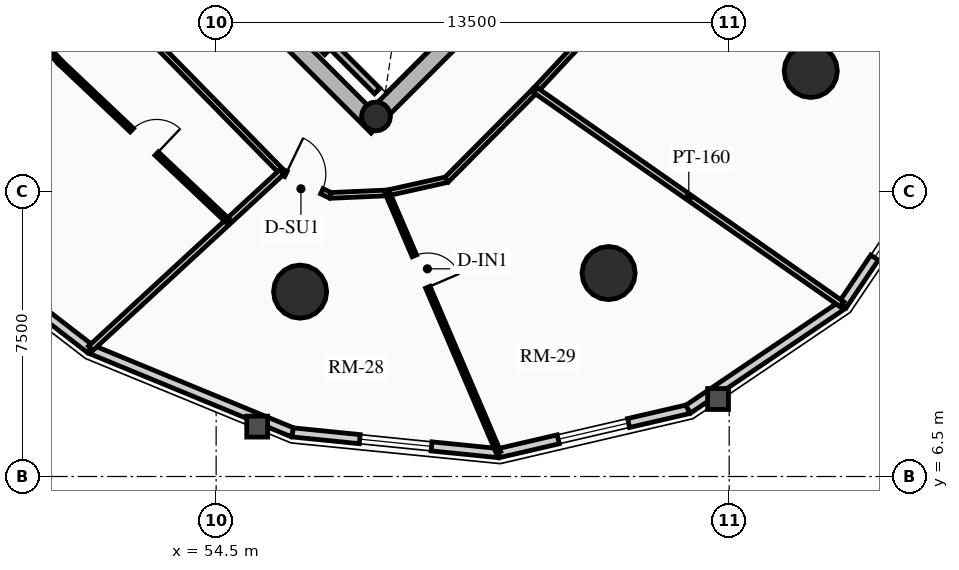
"""IFC4 building model, lengths in metres.
Left out: names, types, materials, properties, quantities, classifications, styles, units other than length and angle.
Written with IfcOpenShell. Run it as: python <this file> out.ifc"""

import sys

from ifc_helpers import new_model, si_unit, direction, frame, frame_2d, origin, origin_2d, place, context, subcontext, project, spatial, rectangle, circle, hollow_circle, extrude, source, transform, mapped, element, fill, save


model = new_model("IFC4")
c1 = context("Model", 3, precision=1e-05, world=origin(), true_north=direction((0.0, 1.0)))
c2 = subcontext(c1, "Body", "Model", "MODEL_VIEW")
j1 = project(units=[si_unit("LENGTHUNIT", "METRE"), si_unit("PLANEANGLEUNIT", "RADIAN")], contexts=[c1])
p1 = place(None, origin())
s1 = spatial("IfcSite", under=j1, at=p1, CompositionType="ELEMENT")
p2 = place(p1, origin())
s2 = spatial("IfcBuilding", under=s1, at=p2, CompositionType="ELEMENT")
p3 = place(p2, frame((0.0, 0.0, 116.71)))
s3 = spatial("IfcBuildingStorey", under=s2, at=p3, CompositionType="ELEMENT", Elevation=116.71)
p4 = place(p3, frame((58.737, 15.697, 0.0), z_axis=(0.0, 0.0, 1.0), x_axis=(-0.707106781187, 0.707106781187, 0.0)))
e1 = element("IfcWall", 1, at=p4, inside=s3, PredefinedType="SHEAR", context=c2, shape_type="SweptSolid", body=[
    extrude(rectangle(XDim=14.2, YDim=0.45, at=frame_2d((7.1, 0.0))), origin(), (0.0, 0.0, 1.0), 2.91),
])
p5 = place(p3, frame((58.578, 15.856, 0.0), z_axis=(0.0, 0.0, 1.0), x_axis=(0.707106781187, 0.707106781187, 0.0)))
e2 = element("IfcWall", 2, at=p5, inside=s3, PredefinedType="SHEAR", context=c2, shape_type="SweptSolid", body=[
    extrude(rectangle(XDim=10.7, YDim=0.45, at=frame_2d((5.35, 0.0))), origin(), (0.0, 0.0, 1.0), 2.91),
])
m1 = source(origin(), c2, "Body", "SweptSolid", [
    extrude(rectangle(XDim=1.5, YDim=2.02, at=frame_2d((0.75, 1.01))), frame((0.0, 0.235, 0.0), z_axis=(0.0, -1.0, 0.0), x_axis=(1.0, 0.0, 0.0)), (0.0, 0.0, 1.0), 0.47),
])
p6 = place(p5, frame((5.45, 0.0, 0.0)))
e3 = element("IfcOpeningElement", 3, at=p6, cuts=e2, PredefinedType="OPENING", context=c2, shape_type="MappedRepresentation", body=[
    mapped(m1, transform((0.0, 0.0, 0.0), x_axis=(1.0, 0.0, 0.0), y_axis=(0.0, 1.0, 0.0), z_axis=(0.0, 0.0, 1.0), scale=1.0)),
])
p7 = place(p3, frame((58.706, 15.976, 0.0), z_axis=(0.0, 0.0, 1.0), x_axis=(0.707106781187, 0.707106781187, 0.0)))
e4 = element("IfcColumn", 4, at=p7, inside=s3, PredefinedType="COLUMN", context=c2, shape_type="SweptSolid", body=[
    extrude(hollow_circle(Radius=0.38, WallThickness=0.032, at=origin_2d()), origin(), (0.0, 0.0, 1.0), 2.91),
])
for number, where, z_axis, x_axis in (
    (5, (56.709, 11.365, 0.0), (0.0, 0.0, 1.0), (1.0, 0.0, 0.0)),
    (6, (64.827, 11.854, 0.0), (0.0, 0.0, 1.0), (1.0, 0.0, 0.0)),
    (7, (70.146, 17.173, 0.0), (0.0, 0.0, 1.0), (1.0, 0.0, 0.0)),
):
    element("IfcColumn", number, at=place(p3, frame(where, z_axis=z_axis, x_axis=x_axis)), inside=s3, PredefinedType="USERDEFINED", context=c2, shape_type="SweptSolid", body=[
        extrude(circle(Radius=0.7, at=origin_2d()), origin(), (0.0, 0.0, 1.0), 2.91),
    ])
p8 = place(p3, frame((51.189, 9.855, 0.0), z_axis=(0.0, 0.0, 1.0), x_axis=(-0.791982052206, 0.61054437102, 0.0)))
e8 = element("IfcWall", 8, at=p8, inside=s3, PredefinedType="SOLIDWALL", context=c2, shape_type="SweptSolid", body=[
    extrude(rectangle(XDim=5.942, YDim=0.24, at=frame_2d((2.971, 0.0))), origin(), (0.0, 0.0, 1.0), 2.179),
])
m2 = source(origin(), c2, "Body", "SweptSolid", [
    extrude(rectangle(XDim=1.9, YDim=1.35, at=frame_2d((0.95, 0.675))), frame((0.0, 0.13, 0.0), z_axis=(0.0, -1.0, 0.0), x_axis=(1.0, 0.0, 0.0)), (0.0, 0.0, 1.0), 0.26),
])
p9 = place(p8, frame((2.021, 0.0, 0.65)))
e9 = element("IfcOpeningElement", 9, at=p9, cuts=e8, PredefinedType="OPENING", context=c2, shape_type="MappedRepresentation", body=[
    mapped(m2, transform((0.0, 0.0, 0.0), x_axis=(1.0, 0.0, 0.0), y_axis=(0.0, 1.0, 0.0), z_axis=(0.0, 0.0, 1.0), scale=1.0)),
])
p10 = place(p3, frame((56.513, 7.661, 0.0), z_axis=(0.0, 0.0, 1.0), x_axis=(-0.924563909604, 0.381027003055, 0.0)))
e10 = element("IfcWall", 10, at=p10, inside=s3, PredefinedType="SOLIDWALL", context=c2, shape_type="SweptSolid", body=[
    extrude(rectangle(XDim=5.758, YDim=0.24, at=frame_2d((2.879, 0.0))), origin(), (0.0, 0.0, 1.0), 2.179),
])
p11 = place(p3, frame((61.933, 7.115, 0.0), z_axis=(0.0, 0.0, 1.0), x_axis=(-0.994971754311, 0.10015591906, 0.0)))
e11 = element("IfcWall", 11, at=p11, inside=s3, PredefinedType="SOLIDWALL", context=c2, shape_type="SweptSolid", body=[
    extrude(rectangle(XDim=5.448, YDim=0.24, at=frame_2d((2.724, 0.0))), origin(), (0.0, 0.0, 1.0), 2.179),
])
p12 = place(p11, frame((1.774, 0.0, 0.65)))
e12 = element("IfcOpeningElement", 12, at=p12, cuts=e11, PredefinedType="OPENING", context=c2, shape_type="MappedRepresentation", body=[
    mapped(m2, transform((0.0, 0.0, 0.0), x_axis=(1.0, 0.0, 0.0), y_axis=(0.0, 1.0, 0.0), z_axis=(0.0, 0.0, 1.0), scale=1.0)),
])
p13 = place(p3, frame((66.92, 8.271, 0.0), z_axis=(0.0, 0.0, 1.0), x_axis=(-0.974165631126, -0.225834725257, 0.0)))
e13 = element("IfcWall", 13, at=p13, inside=s3, PredefinedType="SOLIDWALL", context=c2, shape_type="SweptSolid", body=[
    extrude(rectangle(XDim=5.119, YDim=0.24, at=frame_2d((2.56, 0.0))), origin(), (0.0, 0.0, 1.0), 2.179),
])
p14 = place(p13, frame((1.609, 0.0, 0.65)))
e14 = element("IfcOpeningElement", 14, at=p14, cuts=e13, PredefinedType="OPENING", context=c2, shape_type="MappedRepresentation", body=[
    mapped(m2, transform((0.0, 0.0, 0.0), x_axis=(1.0, 0.0, 0.0), y_axis=(0.0, 1.0, 0.0), z_axis=(0.0, 0.0, 1.0), scale=1.0)),
])
p15 = place(p3, frame((70.985, 11.015, 0.0), z_axis=(0.0, 0.0, 1.0), x_axis=(-0.828781148131, -0.559572880421, 0.0)))
e15 = element("IfcWall", 15, at=p15, inside=s3, PredefinedType="SOLIDWALL", context=c2, shape_type="SweptSolid", body=[
    extrude(rectangle(XDim=4.905, YDim=0.24, at=frame_2d((2.452, 0.0))), origin(), (0.0, 0.0, 1.0), 2.179),
])
p16 = place(p3, frame((73.729, 15.08, 0.0), z_axis=(0.0, 0.0, 1.0), x_axis=(-0.559572880421, -0.828781148131, 0.0)))
e16 = element("IfcWall", 16, at=p16, inside=s3, PredefinedType="SOLIDWALL", context=c2, shape_type="SweptSolid", body=[
    extrude(rectangle(XDim=4.905, YDim=0.24, at=frame_2d((2.452, 0.0))), origin(), (0.0, 0.0, 1.0), 2.179),
])
p17 = place(p16, frame((1.502, 0.0, 0.65)))
e17 = element("IfcOpeningElement", 17, at=p17, cuts=e16, PredefinedType="OPENING", context=c2, shape_type="MappedRepresentation", body=[
    mapped(m2, transform((0.0, 0.0, 0.0), x_axis=(1.0, 0.0, 0.0), y_axis=(0.0, 1.0, 0.0), z_axis=(0.0, 0.0, 1.0), scale=1.0)),
])
p18 = place(p3, frame((57.284, 17.673, 0.0), z_axis=(0.0, 0.0, 1.0), x_axis=(0.707147878904, 0.70706568108, 0.0)))
e18 = element("IfcWall", 18, at=p18, inside=s3, PredefinedType="SHEAR", context=c2, shape_type="SweptSolid", body=[
    extrude(rectangle(XDim=2.97, YDim=0.2, at=frame_2d((1.485, 0.0))), origin(), (0.0, 0.0, 1.0), 2.91),
])
p19 = place(p3, frame((58.737, 16.644, 0.0), z_axis=(0.0, 0.0, 1.0), x_axis=(-0.707032117043, 0.707181437447, 0.0)))
e19 = element("IfcWall", 19, at=p19, inside=s3, PredefinedType="SHEAR", context=c2, shape_type="SweptSolid", body=[
    extrude(rectangle(XDim=1.635, YDim=0.2, at=frame_2d((0.817, 0.0))), origin(), (0.0, 0.0, 1.0), 2.91),
])
p20 = place(p3, frame((51.914, 18.914, 0.0), z_axis=(0.0, 0.0, 1.0), x_axis=(0.699999313799, -0.714143515465, 0.0)))
e20 = element("IfcWall", 20, at=p20, inside=s3, PredefinedType="PARTITIONING", context=c2, shape_type="SweptSolid", body=[
    extrude(rectangle(XDim=6.162, YDim=0.15, at=frame_2d((3.081, 0.0))), origin(), (0.0, 0.0, 1.0), 2.225),
])
p21 = place(p3, frame((56.227, 14.513, 0.0), z_axis=(0.0, 0.0, 1.0), x_axis=(0.901477579283, -0.432825801044, 0.0)))
e21 = element("IfcWall", 21, at=p21, inside=s3, PredefinedType="PARTITIONING", context=c2, shape_type="SweptSolid", body=[
    extrude(rectangle(XDim=1.424, YDim=0.15, at=frame_2d((0.712, 0.0))), origin(), (0.0, 0.0, 1.0), 2.225),
])
m3 = source(origin(), c2, "Body", "SweptSolid", [
    extrude(rectangle(XDim=1.05, YDim=2.015, at=frame_2d((0.525, 1.007))), frame((0.0, 0.085, 0.0), z_axis=(0.0, -1.0, 0.0), x_axis=(1.0, 0.0, 0.0)), (0.0, 0.0, 1.0), 0.17),
])
p22 = place(p21, frame((0.12, 0.0, 0.0)))
e22 = element("IfcOpeningElement", 22, at=p22, cuts=e21, PredefinedType="OPENING", context=c2, shape_type="MappedRepresentation", body=[
    mapped(m3, transform((0.0, 0.0, 0.0), x_axis=(1.0, 0.0, 0.0), y_axis=(0.0, 1.0, 0.0), z_axis=(0.0, 0.0, 1.0), scale=1.0)),
])
p23 = place(p3, frame((57.511, 13.897, 0.0), z_axis=(0.0, 0.0, 1.0), x_axis=(0.999024538494, 0.044158481476, 0.0)))
e23 = element("IfcWall", 23, at=p23, inside=s3, PredefinedType="PARTITIONING", context=c2, shape_type="SweptSolid", body=[
    extrude(rectangle(XDim=1.498, YDim=0.15, at=frame_2d((0.749, 0.0))), origin(), (0.0, 0.0, 1.0), 2.225),
])
p24 = place(p3, frame((59.008, 13.963, 0.0), z_axis=(0.0, 0.0, 1.0), x_axis=(0.976020856791, 0.21767702476, 0.0)))
e24 = element("IfcWall", 24, at=p24, inside=s3, PredefinedType="PARTITIONING", context=c2, shape_type="SweptSolid", body=[
    extrude(rectangle(XDim=1.593, YDim=0.15, at=frame_2d((0.796, 0.0))), origin(), (0.0, 0.0, 1.0), 2.225),
])
p25 = place(p3, frame((60.562, 14.31, 0.0), z_axis=(0.0, 0.0, 1.0), x_axis=(0.704566236161, 0.709638230975, 0.0)))
e25 = element("IfcWall", 25, at=p25, inside=s3, PredefinedType="PARTITIONING", context=c2, shape_type="SweptSolid", body=[
    extrude(rectangle(XDim=3.321, YDim=0.15, at=frame_2d((1.661, 0.0))), origin(), (0.0, 0.0, 1.0), 2.225),
])
p26 = place(p3, frame((62.903, 16.667, 0.0), z_axis=(0.0, 0.0, 1.0), x_axis=(0.682371947497, 0.731005147225, 0.0)))
e26 = element("IfcWall", 26, at=p26, inside=s3, PredefinedType="PARTITIONING", context=c2, shape_type="SweptSolid", body=[
    extrude(rectangle(XDim=6.642, YDim=0.15, at=frame_2d((3.321, 0.0))), origin(), (0.0, 0.0, 1.0), 2.225),
])
p27 = place(p3, frame((56.227, 14.513, 0.0), z_axis=(0.0, 0.0, 1.0), x_axis=(-0.734951144322, -0.678120059768, 0.0)))
e27 = element("IfcWall", 27, at=p27, inside=s3, PredefinedType="PARTITIONING", context=c2, shape_type="SweptSolid", body=[
    extrude(rectangle(XDim=6.843, YDim=0.16, at=frame_2d((3.422, 0.0))), origin(), (0.0, 0.0, 1.0), 2.179),
])
p28 = place(p3, frame((62.903, 16.667, 0.0), z_axis=(0.0, 0.0, 1.0), x_axis=(0.819735047612, -0.572742919395, 0.0)))
e28 = element("IfcWall", 28, at=p28, inside=s3, PredefinedType="PARTITIONING", context=c2, shape_type="SweptSolid", body=[
    extrude(rectangle(XDim=9.842, YDim=0.16, at=frame_2d((4.921, 0.0))), origin(), (0.0, 0.0, 1.0), 2.179),
])
p29 = place(p3, frame((46.352, 21.838, 0.0), z_axis=(0.0, 0.0, 1.0), x_axis=(0.673416949194, -0.739262884594, 0.0)))
e29 = element("IfcWall", 29, at=p29, inside=s3, PredefinedType="PARTITIONING", context=c2, shape_type="SweptSolid", body=[
    extrude(rectangle(XDim=6.007, YDim=0.125, at=frame_2d((3.003, 0.0))), origin(), (0.0, 0.0, 1.0), 2.655),
])
p30 = place(p3, frame((50.397, 17.397, 0.0), z_axis=(0.0, 0.0, 1.0), x_axis=(0.726427828833, -0.687242758781, 0.0)))
e30 = element("IfcWall", 30, at=p30, inside=s3, PredefinedType="PARTITIONING", context=c2, shape_type="SweptSolid", body=[
    extrude(rectangle(XDim=6.087, YDim=0.125, at=frame_2d((3.043, 0.0))), origin(), (0.0, 0.0, 1.0), 2.225),
])
m4 = source(origin(), c2, "Body", "SweptSolid", [
    extrude(rectangle(XDim=0.9, YDim=2.005, at=frame_2d((0.45, 1.002))), frame((0.0, 0.073, 0.0), z_axis=(0.0, -1.0, 0.0), x_axis=(1.0, 0.0, 0.0)), (0.0, 0.0, 1.0), 0.145),
])
p31 = place(p30, frame((2.594, 0.0, 0.0)))
e31 = element("IfcOpeningElement", 31, at=p31, cuts=e30, PredefinedType="OPENING", context=c2, shape_type="MappedRepresentation", body=[
    mapped(m4, transform((0.0, 0.0, 0.0), x_axis=(1.0, 0.0, 0.0), y_axis=(0.0, 1.0, 0.0), z_axis=(0.0, 0.0, 1.0), scale=1.0)),
])
p32 = place(p3, frame((59.008, 13.963, 0.0), z_axis=(0.0, 0.0, 1.0), x_axis=(0.393439207333, -0.919350635032, 0.0)))
e32 = element("IfcWall", 32, at=p32, inside=s3, PredefinedType="PARTITIONING", context=c2, shape_type="SweptSolid", body=[
    extrude(rectangle(XDim=7.427, YDim=0.125, at=frame_2d((3.713, 0.0))), origin(), (0.0, 0.0, 1.0), 2.179),
])
p33 = place(p32, frame((1.8, 0.0, 0.0)))
e33 = element("IfcOpeningElement", 33, at=p33, cuts=e32, PredefinedType="OPENING", context=c2, shape_type="MappedRepresentation", body=[
    mapped(m4, transform((0.0, 0.0, 0.0), x_axis=(1.0, 0.0, 0.0), y_axis=(0.0, 1.0, 0.0), z_axis=(0.0, 0.0, 1.0), scale=1.0)),
])
m5 = source(origin(), c2, "Body", "SweptSolid", [
    extrude(rectangle(XDim=1.9, YDim=1.35, at=frame_2d((0.95, 0.675))), frame((0.0, 0.03, 0.0), z_axis=(0.0, -1.0, 0.0), x_axis=(1.0, 0.0, 0.0)), (0.0, 0.0, 1.0), 0.06),
])
p34 = place(p12, origin())
e34 = element("IfcWindow", 34, at=p34, inside=s3, PartitioningType="DOUBLE_PANEL_VERTICAL", PredefinedType="WINDOW", context=c2, shape_type="MappedRepresentation", body=[
    mapped(m5, transform((0.0, 0.0, 0.0), x_axis=(1.0, 0.0, 0.0), y_axis=(0.0, 1.0, 0.0), z_axis=(0.0, 0.0, 1.0), scale=1.0)),
])
fill(e12, e34)
p35 = place(p14, origin())
e35 = element("IfcWindow", 35, at=p35, inside=s3, PartitioningType="DOUBLE_PANEL_VERTICAL", PredefinedType="WINDOW", context=c2, shape_type="MappedRepresentation", body=[
    mapped(m5, transform((0.0, 0.0, 0.0), x_axis=(1.0, 0.0, 0.0), y_axis=(0.0, 1.0, 0.0), z_axis=(0.0, 0.0, 1.0), scale=1.0)),
])
fill(e14, e35)
p36 = place(p17, origin())
e36 = element("IfcWindow", 36, at=p36, inside=s3, PartitioningType="DOUBLE_PANEL_VERTICAL", PredefinedType="WINDOW", context=c2, shape_type="MappedRepresentation", body=[
    mapped(m5, transform((0.0, 0.0, 0.0), x_axis=(1.0, 0.0, 0.0), y_axis=(0.0, 1.0, 0.0), z_axis=(0.0, 0.0, 1.0), scale=1.0)),
])
fill(e17, e36)
m6 = source(origin(), c2, "Body", "SweptSolid", [
    extrude(rectangle(XDim=0.9, YDim=2.005, at=frame_2d((0.45, 1.002))), frame((0.0, 0.025, 0.0), z_axis=(0.0, -1.0, 0.0), x_axis=(1.0, 0.0, 0.0)), (0.0, 0.0, 1.0), 0.05),
])
p37 = place(p31, origin())
e37 = element("IfcDoor", 37, at=p37, inside=s3, OperationType="SINGLE_SWING_RIGHT", PredefinedType="DOOR", context=c2, shape_type="MappedRepresentation", body=[
    mapped(m6, transform((0.0, 0.0, 0.0), x_axis=(1.0, 0.0, 0.0), y_axis=(0.0, 1.0, 0.0), z_axis=(0.0, 0.0, 1.0), scale=1.0)),
])
fill(e31, e37)
m7 = source(origin(), c2, "Body", "SweptSolid", [
    extrude(rectangle(XDim=1.05, YDim=2.015, at=frame_2d((0.525, 1.007))), frame((0.0, 0.025, 0.0), z_axis=(0.0, -1.0, 0.0), x_axis=(1.0, 0.0, 0.0)), (0.0, 0.0, 1.0), 0.05),
])
p38 = place(p22, origin())
e38 = element("IfcDoor", 38, at=p38, inside=s3, OperationType="SINGLE_SWING_LEFT", PredefinedType="DOOR", context=c2, shape_type="MappedRepresentation", body=[
    mapped(m7, transform((0.0, 0.0, 0.0), x_axis=(1.0, 0.0, 0.0), y_axis=(0.0, 1.0, 0.0), z_axis=(0.0, 0.0, 1.0), scale=1.0)),
])
fill(e22, e38)
p39 = place(p33, origin())
e39 = element("IfcDoor", 39, at=p39, inside=s3, OperationType="SINGLE_SWING_RIGHT", PredefinedType="DOOR", context=c2, shape_type="MappedRepresentation", body=[
    mapped(m6, transform((0.0, 0.0, 0.0), x_axis=(1.0, 0.0, 0.0), y_axis=(0.0, 1.0, 0.0), z_axis=(0.0, 0.0, 1.0), scale=1.0)),
])
fill(e33, e39)
save(model, sys.argv[1])
